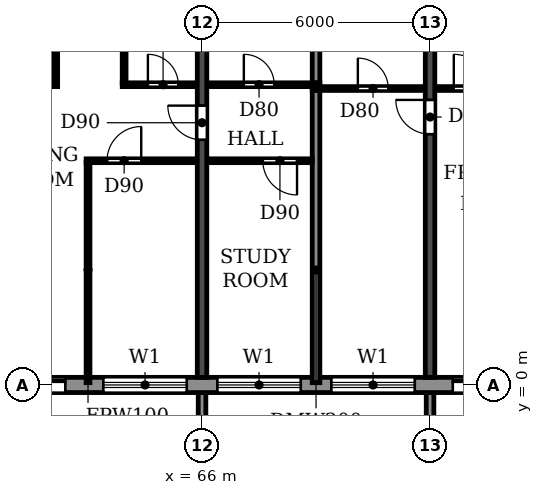
"""IFC4 building model, lengths in metres.
Left out: names, types, materials, properties, quantities, classifications, styles, units other than length and angle.
Written with IfcOpenShell. Run it as: python <this file> out.ifc"""

import sys

from ifc_helpers import new_model, si_unit, direction, frame, frame_2d, origin, place, context, subcontext, project, spatial, polyline, rectangle, outline, extrude, source, transform, mapped, element, fill, save


model = new_model("IFC4")
c1 = context("Model", 3, precision=1e-05, world=origin(), true_north=direction((0.0, 1.0)))
c2 = subcontext(c1, "Body", "Model", "MODEL_VIEW")
j1 = project(units=[si_unit("LENGTHUNIT", "METRE"), si_unit("PLANEANGLEUNIT", "RADIAN")], contexts=[c1])
p1 = place(None, origin())
s1 = spatial("IfcSite", under=j1, at=p1, CompositionType="ELEMENT")
p2 = place(p1, origin())
s2 = spatial("IfcBuilding", under=s1, at=p2, CompositionType="ELEMENT")
p3 = place(p2, frame((0.0, 0.0, 181.8)))
s3 = spatial("IfcBuildingStorey", under=s2, at=p3, CompositionType="ELEMENT", Elevation=181.8)
p4 = place(p3, frame((66.0, 0.2, 0.0), z_axis=(0.0, 0.0, 1.0), x_axis=(0.0, 1.0, 0.0)))
e1 = element("IfcWall", 1, at=p4, inside=s3, PredefinedType="SHEAR", context=c2, shape_type="SweptSolid", body=[
    extrude(rectangle(XDim=11.7, YDim=0.25, at=frame_2d((5.85, 0.0))), origin(), (0.0, 0.0, 1.0), 3.08),
])
p5 = place(p4, frame((6.25, 0.0, 0.0)))
e2 = element("IfcOpeningElement", 2, at=p5, cuts=e1, PredefinedType="OPENING", context=c2, shape_type="SweptSolid", body=[
    extrude(rectangle(XDim=0.9, YDim=2.1, at=frame_2d((0.45, 1.05))), frame((0.0, 0.135, 0.0), z_axis=(0.0, -1.0, 0.0), x_axis=(1.0, 0.0, 0.0)), (0.0, 0.0, 1.0), 0.27),
])
p6 = place(p3, frame((72.0, 0.2, 0.0), z_axis=(0.0, 0.0, 1.0), x_axis=(0.0, 1.0, 0.0)))
e3 = element("IfcWall", 3, at=p6, inside=s3, PredefinedType="SHEAR", context=c2, shape_type="SweptSolid", body=[
    extrude(rectangle(XDim=11.7, YDim=0.25, at=frame_2d((5.85, 0.0))), origin(), (0.0, 0.0, 1.0), 3.08),
])
p7 = place(p6, frame((6.4, 0.0, 0.0)))
e4 = element("IfcOpeningElement", 4, at=p7, cuts=e3, PredefinedType="OPENING", context=c2, shape_type="SweptSolid", body=[
    extrude(rectangle(XDim=0.9, YDim=2.1, at=frame_2d((0.45, 1.05))), frame((0.0, 0.135, 0.0), z_axis=(0.0, -1.0, 0.0), x_axis=(1.0, 0.0, 0.0)), (0.0, 0.0, 1.0), 0.27),
])
p8 = place(p3, frame((22.683, 0.0, 0.0), z_axis=(0.0, 0.0, 1.0), x_axis=(1.0, 0.0, 0.0)))
e5 = element("IfcWall", 5, at=p8, inside=s3, PredefinedType="STANDARD", context=c2, shape_type="SweptSolid", body=[
    extrude(rectangle(XDim=56.634, YDim=0.4, at=frame_2d((28.317, 0.0))), origin(), (0.0, 0.0, 1.0), 3.08),
])
p9 = place(p8, frame((1.717, 0.0, 0.9)))
e6 = element("IfcOpeningElement", 6, at=p9, cuts=e5, PredefinedType="OPENING", context=c2, shape_type="SweptSolid", body=[
    extrude(rectangle(XDim=2.2, YDim=1.5, at=frame_2d((1.1, 0.75))), frame((0.0, 0.21, 0.0), z_axis=(0.0, -1.0, 0.0), x_axis=(1.0, 0.0, 0.0)), (0.0, 0.0, 1.0), 0.42),
])
p10 = place(p8, frame((4.917, 0.0, 0.0)))
e7 = element("IfcOpeningElement", 7, at=p10, cuts=e5, PredefinedType="OPENING", context=c2, shape_type="SweptSolid", body=[
    extrude(rectangle(XDim=1.8, YDim=2.4, at=frame_2d((0.9, 1.2))), frame((0.0, 0.21, 0.0), z_axis=(0.0, -1.0, 0.0), x_axis=(1.0, 0.0, 0.0)), (0.0, 0.0, 1.0), 0.42),
])
p11 = place(p8, frame((7.717, 0.0, 0.9)))
e8 = element("IfcOpeningElement", 8, at=p11, cuts=e5, PredefinedType="OPENING", context=c2, shape_type="SweptSolid", body=[
    extrude(rectangle(XDim=2.2, YDim=1.5, at=frame_2d((1.1, 0.75))), frame((0.0, 0.21, 0.0), z_axis=(0.0, -1.0, 0.0), x_axis=(1.0, 0.0, 0.0)), (0.0, 0.0, 1.0), 0.42),
])
p12 = place(p8, frame((10.717, 0.0, 0.9)))
e9 = element("IfcOpeningElement", 9, at=p12, cuts=e5, PredefinedType="OPENING", context=c2, shape_type="SweptSolid", body=[
    extrude(rectangle(XDim=2.2, YDim=1.5, at=frame_2d((1.1, 0.75))), frame((0.0, 0.21, 0.0), z_axis=(0.0, -1.0, 0.0), x_axis=(1.0, 0.0, 0.0)), (0.0, 0.0, 1.0), 0.42),
])
p13 = place(p8, frame((13.717, 0.0, 0.9)))
e10 = element("IfcOpeningElement", 10, at=p13, cuts=e5, PredefinedType="OPENING", context=c2, shape_type="SweptSolid", body=[
    extrude(rectangle(XDim=2.2, YDim=1.5, at=frame_2d((1.1, 0.75))), frame((0.0, 0.21, 0.0), z_axis=(0.0, -1.0, 0.0), x_axis=(1.0, 0.0, 0.0)), (0.0, 0.0, 1.0), 0.42),
])
p14 = place(p8, frame((16.717, 0.0, 0.9)))
e11 = element("IfcOpeningElement", 11, at=p14, cuts=e5, PredefinedType="OPENING", context=c2, shape_type="SweptSolid", body=[
    extrude(rectangle(XDim=2.2, YDim=1.5, at=frame_2d((1.1, 0.75))), frame((0.0, 0.21, 0.0), z_axis=(0.0, -1.0, 0.0), x_axis=(1.0, 0.0, 0.0)), (0.0, 0.0, 1.0), 0.42),
])
p15 = place(p8, frame((19.717, 0.0, 0.9)))
e12 = element("IfcOpeningElement", 12, at=p15, cuts=e5, PredefinedType="OPENING", context=c2, shape_type="SweptSolid", body=[
    extrude(rectangle(XDim=2.2, YDim=1.5, at=frame_2d((1.1, 0.75))), frame((0.0, 0.21, 0.0), z_axis=(0.0, -1.0, 0.0), x_axis=(1.0, 0.0, 0.0)), (0.0, 0.0, 1.0), 0.42),
])
p16 = place(p8, frame((22.717, 0.0, 0.9)))
e13 = element("IfcOpeningElement", 13, at=p16, cuts=e5, PredefinedType="OPENING", context=c2, shape_type="SweptSolid", body=[
    extrude(rectangle(XDim=2.2, YDim=1.5, at=frame_2d((1.1, 0.75))), frame((0.0, 0.21, 0.0), z_axis=(0.0, -1.0, 0.0), x_axis=(1.0, 0.0, 0.0)), (0.0, 0.0, 1.0), 0.42),
])
p17 = place(p8, frame((25.717, 0.0, 0.9)))
e14 = element("IfcOpeningElement", 14, at=p17, cuts=e5, PredefinedType="OPENING", context=c2, shape_type="SweptSolid", body=[
    extrude(rectangle(XDim=2.2, YDim=1.5, at=frame_2d((1.1, 0.75))), frame((0.0, 0.21, 0.0), z_axis=(0.0, -1.0, 0.0), x_axis=(1.0, 0.0, 0.0)), (0.0, 0.0, 1.0), 0.42),
])
p18 = place(p8, frame((28.717, 0.0, 0.9)))
e15 = element("IfcOpeningElement", 15, at=p18, cuts=e5, PredefinedType="OPENING", context=c2, shape_type="SweptSolid", body=[
    extrude(rectangle(XDim=2.2, YDim=1.5, at=frame_2d((1.1, 0.75))), frame((0.0, 0.21, 0.0), z_axis=(0.0, -1.0, 0.0), x_axis=(1.0, 0.0, 0.0)), (0.0, 0.0, 1.0), 0.42),
])
p19 = place(p8, frame((31.717, 0.0, 0.9)))
e16 = element("IfcOpeningElement", 16, at=p19, cuts=e5, PredefinedType="OPENING", context=c2, shape_type="SweptSolid", body=[
    extrude(rectangle(XDim=2.2, YDim=1.5, at=frame_2d((1.1, 0.75))), frame((0.0, 0.21, 0.0), z_axis=(0.0, -1.0, 0.0), x_axis=(1.0, 0.0, 0.0)), (0.0, 0.0, 1.0), 0.42),
])
p20 = place(p8, frame((34.717, 0.0, 0.9)))
e17 = element("IfcOpeningElement", 17, at=p20, cuts=e5, PredefinedType="OPENING", context=c2, shape_type="SweptSolid", body=[
    extrude(rectangle(XDim=2.2, YDim=1.5, at=frame_2d((1.1, 0.75))), frame((0.0, 0.21, 0.0), z_axis=(0.0, -1.0, 0.0), x_axis=(1.0, 0.0, 0.0)), (0.0, 0.0, 1.0), 0.42),
])
p21 = place(p8, frame((37.917, 0.0, 0.0)))
e18 = element("IfcOpeningElement", 18, at=p21, cuts=e5, PredefinedType="OPENING", context=c2, shape_type="SweptSolid", body=[
    extrude(rectangle(XDim=1.8, YDim=2.4, at=frame_2d((0.9, 1.2))), frame((0.0, 0.21, 0.0), z_axis=(0.0, -1.0, 0.0), x_axis=(1.0, 0.0, 0.0)), (0.0, 0.0, 1.0), 0.42),
])
p22 = place(p8, frame((40.717, 0.0, 0.9)))
e19 = element("IfcOpeningElement", 19, at=p22, cuts=e5, PredefinedType="OPENING", context=c2, shape_type="SweptSolid", body=[
    extrude(rectangle(XDim=2.2, YDim=1.5, at=frame_2d((1.1, 0.75))), frame((0.0, 0.21, 0.0), z_axis=(0.0, -1.0, 0.0), x_axis=(1.0, 0.0, 0.0)), (0.0, 0.0, 1.0), 0.42),
])
p23 = place(p8, frame((43.717, 0.0, 0.9)))
e20 = element("IfcOpeningElement", 20, at=p23, cuts=e5, PredefinedType="OPENING", context=c2, shape_type="SweptSolid", body=[
    extrude(rectangle(XDim=2.2, YDim=1.5, at=frame_2d((1.1, 0.75))), frame((0.0, 0.21, 0.0), z_axis=(0.0, -1.0, 0.0), x_axis=(1.0, 0.0, 0.0)), (0.0, 0.0, 1.0), 0.42),
])
p24 = place(p8, frame((46.717, 0.0, 0.9)))
e21 = element("IfcOpeningElement", 21, at=p24, cuts=e5, PredefinedType="OPENING", context=c2, shape_type="SweptSolid", body=[
    extrude(rectangle(XDim=2.2, YDim=1.5, at=frame_2d((1.1, 0.75))), frame((0.0, 0.21, 0.0), z_axis=(0.0, -1.0, 0.0), x_axis=(1.0, 0.0, 0.0)), (0.0, 0.0, 1.0), 0.42),
])
p25 = place(p8, frame((49.917, 0.0, 0.0)))
e22 = element("IfcOpeningElement", 22, at=p25, cuts=e5, PredefinedType="OPENING", context=c2, shape_type="SweptSolid", body=[
    extrude(rectangle(XDim=1.8, YDim=2.4, at=frame_2d((0.9, 1.2))), frame((0.0, 0.21, 0.0), z_axis=(0.0, -1.0, 0.0), x_axis=(1.0, 0.0, 0.0)), (0.0, 0.0, 1.0), 0.42),
])
p26 = place(p8, frame((52.717, 0.0, 0.9)))
e23 = element("IfcOpeningElement", 23, at=p26, cuts=e5, PredefinedType="OPENING", context=c2, shape_type="SweptSolid", body=[
    extrude(rectangle(XDim=2.2, YDim=1.5, at=frame_2d((1.1, 0.75))), frame((0.0, 0.21, 0.0), z_axis=(0.0, -1.0, 0.0), x_axis=(1.0, 0.0, 0.0)), (0.0, 0.0, 1.0), 0.42),
])
m1 = source(origin(), c2, "Body", "SweptSolid", [
    extrude(outline(polyline([(0.0, 0.0), (0.2, 0.0), (0.2, 1.65), (0.0, 1.65), (0.0, 0.0)])), origin(), (0.0, 0.0, 1.0), 3.1),
])
for number, where in (
    (24, (65.9, -1.85, 0.0)),
    (25, (71.9, -1.85, 0.0)),
):
    element("IfcWall", number, at=place(p3, frame(where)), inside=s3, PredefinedType="STANDARD", context=c2, shape_type="MappedRepresentation", body=[
        mapped(m1, transform((0.0, 0.0, 0.0))),
    ])
p27 = place(p3, frame((69.0, 0.06, 0.0), z_axis=(0.0, 0.0, 1.0), x_axis=(0.0, 1.0, 0.0)))
e26 = element("IfcWall", 26, at=p27, inside=s3, PredefinedType="PARTITIONING", context=c2, shape_type="SweptSolid", body=[
    extrude(rectangle(XDim=7.69, YDim=0.2, at=frame_2d((3.845, 0.0))), origin(), (0.0, 0.0, 1.0), 3.08),
])
p28 = place(p3, frame((69.0, 7.95, 0.0), z_axis=(0.0, 0.0, 1.0), x_axis=(0.0, 1.0, 0.0)))
e27 = element("IfcWall", 27, at=p28, inside=s3, PredefinedType="PARTITIONING", context=c2, shape_type="SweptSolid", body=[
    extrude(rectangle(XDim=3.94, YDim=0.2, at=frame_2d((1.97, 0.0))), origin(), (0.0, 0.0, 1.0), 3.08),
])
p29 = place(p3, frame((62.95, 5.9, 0.0), z_axis=(0.0, 0.0, 1.0), x_axis=(1.0, 0.0, 0.0)))
e28 = element("IfcWall", 28, at=p29, inside=s3, PredefinedType="PARTITIONING", context=c2, shape_type="SweptSolid", body=[
    extrude(rectangle(XDim=2.915, YDim=0.1, at=frame_2d((1.458, 0.0))), origin(), (0.0, 0.0, 1.0), 3.08),
])
p30 = place(p29, frame((0.55, 0.0, 0.0)))
e29 = element("IfcOpeningElement", 29, at=p30, cuts=e28, PredefinedType="OPENING", context=c2, shape_type="SweptSolid", body=[
    extrude(rectangle(XDim=0.9, YDim=2.1, at=frame_2d((0.45, 1.05))), frame((0.0, 0.06, 0.0), z_axis=(0.0, -1.0, 0.0), x_axis=(1.0, 0.0, 0.0)), (0.0, 0.0, 1.0), 0.12),
])
p31 = place(p3, frame((66.135, 5.9, 0.0), z_axis=(0.0, 0.0, 1.0), x_axis=(1.0, 0.0, 0.0)))
e30 = element("IfcWall", 30, at=p31, inside=s3, PredefinedType="PARTITIONING", context=c2, shape_type="SweptSolid", body=[
    extrude(rectangle(XDim=2.765, YDim=0.1, at=frame_2d((1.382, 0.0))), origin(), (0.0, 0.0, 1.0), 3.08),
])
p32 = place(p31, frame((1.465, 0.0, 0.0)))
e31 = element("IfcOpeningElement", 31, at=p32, cuts=e30, PredefinedType="OPENING", context=c2, shape_type="SweptSolid", body=[
    extrude(rectangle(XDim=0.9, YDim=2.1, at=frame_2d((0.45, 1.05))), frame((0.0, 0.06, 0.0), z_axis=(0.0, -1.0, 0.0), x_axis=(1.0, 0.0, 0.0)), (0.0, 0.0, 1.0), 0.12),
])
p33 = place(p3, frame((68.9, 7.8, 0.0), z_axis=(0.0, 0.0, 1.0), x_axis=(1.0, 0.0, 0.0)))
e32 = element("IfcWall", 32, at=p33, inside=s3, PredefinedType="PARTITIONING", context=c2, shape_type="SweptSolid", body=[
    extrude(rectangle(XDim=2.965, YDim=0.1, at=frame_2d((1.482, 0.0))), origin(), (0.0, 0.0, 1.0), 3.08),
])
p34 = place(p33, frame((1.2, 0.0, 0.0)))
e33 = element("IfcOpeningElement", 33, at=p34, cuts=e32, PredefinedType="OPENING", context=c2, shape_type="SweptSolid", body=[
    extrude(rectangle(XDim=0.8, YDim=2.1, at=frame_2d((0.4, 1.05))), frame((0.0, 0.06, 0.0), z_axis=(0.0, -1.0, 0.0), x_axis=(1.0, 0.0, 0.0)), (0.0, 0.0, 1.0), 0.12),
])
p35 = place(p3, frame((72.135, 7.8, 0.0), z_axis=(0.0, 0.0, 1.0), x_axis=(1.0, 0.0, 0.0)))
e34 = element("IfcWall", 34, at=p35, inside=s3, PredefinedType="PARTITIONING", context=c2, shape_type="SweptSolid", body=[
    extrude(rectangle(XDim=2.065, YDim=0.1, at=frame_2d((1.032, 0.0))), origin(), (0.0, 0.0, 1.0), 3.08),
])
p36 = place(p35, frame((0.49, 0.0, 0.0)))
e35 = element("IfcOpeningElement", 35, at=p36, cuts=e34, PredefinedType="OPENING", context=c2, shape_type="SweptSolid", body=[
    extrude(rectangle(XDim=0.9, YDim=2.1, at=frame_2d((0.45, 1.05))), frame((0.0, 0.06, 0.0), z_axis=(0.0, -1.0, 0.0), x_axis=(1.0, 0.0, 0.0)), (0.0, 0.0, 1.0), 0.12),
])
p37 = place(p3, frame((60.135, 7.9, 0.0), z_axis=(0.0, 0.0, 1.0), x_axis=(1.0, 0.0, 0.0)))
e36 = element("IfcWall", 36, at=p37, inside=s3, PredefinedType="PARTITIONING", context=c2, shape_type="SweptSolid", body=[
    extrude(rectangle(XDim=2.065, YDim=0.1, at=frame_2d((1.032, 0.0))), origin(), (0.0, 0.0, 1.0), 3.08),
])
p38 = place(p37, frame((0.49, 0.0, 0.0)))
e37 = element("IfcOpeningElement", 37, at=p38, cuts=e36, PredefinedType="OPENING", context=c2, shape_type="SweptSolid", body=[
    extrude(rectangle(XDim=0.9, YDim=2.1, at=frame_2d((0.45, 1.05))), frame((0.0, 0.06, 0.0), z_axis=(0.0, -1.0, 0.0), x_axis=(1.0, 0.0, 0.0)), (0.0, 0.0, 1.0), 0.12),
])
p39 = place(p3, frame((63.9, 7.9, 0.0), z_axis=(0.0, 0.0, 1.0), x_axis=(1.0, 0.0, 0.0)))
e38 = element("IfcWall", 38, at=p39, inside=s3, PredefinedType="PARTITIONING", context=c2, shape_type="SweptSolid", body=[
    extrude(rectangle(XDim=1.965, YDim=0.1, at=frame_2d((0.982, 0.0))), origin(), (0.0, 0.0, 1.0), 3.08),
])
p40 = place(p39, frame((0.675, 0.0, 0.0)))
e39 = element("IfcOpeningElement", 39, at=p40, cuts=e38, PredefinedType="OPENING", context=c2, shape_type="SweptSolid", body=[
    extrude(rectangle(XDim=0.8, YDim=2.1, at=frame_2d((0.4, 1.05))), frame((0.0, 0.06, 0.0), z_axis=(0.0, -1.0, 0.0), x_axis=(1.0, 0.0, 0.0)), (0.0, 0.0, 1.0), 0.12),
])
p41 = place(p3, frame((66.135, 7.9, 0.0), z_axis=(0.0, 0.0, 1.0), x_axis=(1.0, 0.0, 0.0)))
e40 = element("IfcWall", 40, at=p41, inside=s3, PredefinedType="PARTITIONING", context=c2, shape_type="SweptSolid", body=[
    extrude(rectangle(XDim=2.965, YDim=0.1, at=frame_2d((1.482, 0.0))), origin(), (0.0, 0.0, 1.0), 3.08),
])
p42 = place(p41, frame((0.965, 0.0, 0.0)))
e41 = element("IfcOpeningElement", 41, at=p42, cuts=e40, PredefinedType="OPENING", context=c2, shape_type="SweptSolid", body=[
    extrude(rectangle(XDim=0.8, YDim=2.1, at=frame_2d((0.4, 1.05))), frame((0.0, 0.06, 0.0), z_axis=(0.0, -1.0, 0.0), x_axis=(1.0, 0.0, 0.0)), (0.0, 0.0, 1.0), 0.12),
])
p43 = place(p3, frame((62.15, 7.95, 0.0), z_axis=(0.0, 0.0, 1.0), x_axis=(0.0, 1.0, 0.0)))
e42 = element("IfcWall", 42, at=p43, inside=s3, PredefinedType="PARTITIONING", context=c2, shape_type="SweptSolid", body=[
    extrude(rectangle(XDim=3.94, YDim=0.1, at=frame_2d((1.97, 0.0))), origin(), (0.0, 0.0, 1.0), 3.08),
])
p44 = place(p3, frame((63.0, 0.06, 0.0), z_axis=(0.0, 0.0, 1.0), x_axis=(0.0, 1.0, 0.0)))
e43 = element("IfcWall", 43, at=p44, inside=s3, PredefinedType="PARTITIONING", context=c2, shape_type="SweptSolid", body=[
    extrude(rectangle(XDim=5.79, YDim=0.1, at=frame_2d((2.895, 0.0))), origin(), (0.0, 0.0, 1.0), 3.08),
])
p45 = place(p3, frame((63.95, 7.95, 0.0), z_axis=(0.0, 0.0, 1.0), x_axis=(0.0, 1.0, 0.0)))
e44 = element("IfcWall", 44, at=p45, inside=s3, PredefinedType="PARTITIONING", context=c2, shape_type="SweptSolid", body=[
    extrude(rectangle(XDim=3.94, YDim=0.1, at=frame_2d((1.97, 0.0))), origin(), (0.0, 0.0, 1.0), 3.08),
])
p46 = place(p21, origin())
e45 = element("IfcDoor", 45, at=p46, inside=s3, OperationType="DOUBLE_DOOR_SLIDING", PredefinedType="DOOR", context=c2, shape_type="SweptSolid", body=[
    extrude(rectangle(XDim=1.8, YDim=2.4, at=frame_2d((0.9, 1.2))), frame((0.0, 0.025, 0.0), z_axis=(0.0, -1.0, 0.0), x_axis=(1.0, 0.0, 0.0)), (0.0, 0.0, 1.0), 0.05),
])
fill(e18, e45)
p47 = place(p22, origin())
e46 = element("IfcWindow", 46, at=p47, inside=s3, PartitioningType="DOUBLE_PANEL_HORIZONTAL", PredefinedType="WINDOW", context=c2, shape_type="SweptSolid", body=[
    extrude(rectangle(XDim=2.2, YDim=1.5, at=frame_2d((1.1, 0.75))), frame((0.0, 0.03, 0.0), z_axis=(0.0, -1.0, 0.0), x_axis=(1.0, 0.0, 0.0)), (0.0, 0.0, 1.0), 0.06),
])
fill(e19, e46)
p48 = place(p23, origin())
e47 = element("IfcWindow", 47, at=p48, inside=s3, PartitioningType="DOUBLE_PANEL_HORIZONTAL", PredefinedType="WINDOW", context=c2, shape_type="SweptSolid", body=[
    extrude(rectangle(XDim=2.2, YDim=1.5, at=frame_2d((1.1, 0.75))), frame((0.0, 0.03, 0.0), z_axis=(0.0, -1.0, 0.0), x_axis=(1.0, 0.0, 0.0)), (0.0, 0.0, 1.0), 0.06),
])
fill(e20, e47)
p49 = place(p24, origin())
e48 = element("IfcWindow", 48, at=p49, inside=s3, PartitioningType="DOUBLE_PANEL_HORIZONTAL", PredefinedType="WINDOW", context=c2, shape_type="SweptSolid", body=[
    extrude(rectangle(XDim=2.2, YDim=1.5, at=frame_2d((1.1, 0.75))), frame((0.0, 0.03, 0.0), z_axis=(0.0, -1.0, 0.0), x_axis=(1.0, 0.0, 0.0)), (0.0, 0.0, 1.0), 0.06),
])
fill(e21, e48)
p50 = place(p25, origin())
e49 = element("IfcDoor", 49, at=p50, inside=s3, OperationType="DOUBLE_DOOR_SLIDING", PredefinedType="DOOR", context=c2, shape_type="SweptSolid", body=[
    extrude(rectangle(XDim=1.8, YDim=2.4, at=frame_2d((0.9, 1.2))), frame((0.0, 0.025, 0.0), z_axis=(0.0, -1.0, 0.0), x_axis=(1.0, 0.0, 0.0)), (0.0, 0.0, 1.0), 0.05),
])
fill(e22, e49)
p51 = place(p42, origin())
e50 = element("IfcDoor", 50, at=p51, inside=s3, OperationType="SINGLE_SWING_LEFT", PredefinedType="DOOR", context=c2, shape_type="SweptSolid", body=[
    extrude(rectangle(XDim=0.8, YDim=2.1, at=frame_2d((0.4, 1.05))), frame((0.0, 0.025, 0.0), z_axis=(0.0, -1.0, 0.0), x_axis=(1.0, 0.0, 0.0)), (0.0, 0.0, 1.0), 0.05),
])
fill(e41, e50)
p52 = place(p32, frame((0.9, 0.0, 0.0), z_axis=(0.0, 0.0, 1.0), x_axis=(-1.0, 0.0, 0.0)))
e51 = element("IfcDoor", 51, at=p52, inside=s3, OperationType="SINGLE_SWING_LEFT", PredefinedType="DOOR", context=c2, shape_type="SweptSolid", body=[
    extrude(rectangle(XDim=0.9, YDim=2.1, at=frame_2d((0.45, 1.05))), frame((0.0, 0.025, 0.0), z_axis=(0.0, -1.0, 0.0), x_axis=(1.0, 0.0, 0.0)), (0.0, 0.0, 1.0), 0.05),
])
fill(e31, e51)
p53 = place(p30, origin())
e52 = element("IfcDoor", 52, at=p53, inside=s3, OperationType="SINGLE_SWING_RIGHT", PredefinedType="DOOR", context=c2, shape_type="SweptSolid", body=[
    extrude(rectangle(XDim=0.9, YDim=2.1, at=frame_2d((0.45, 1.05))), frame((0.0, 0.025, 0.0), z_axis=(0.0, -1.0, 0.0), x_axis=(1.0, 0.0, 0.0)), (0.0, 0.0, 1.0), 0.05),
])
fill(e29, e52)
p54 = place(p40, origin())
e53 = element("IfcDoor", 53, at=p54, inside=s3, OperationType="SINGLE_SWING_LEFT", PredefinedType="DOOR", context=c2, shape_type="SweptSolid", body=[
    extrude(rectangle(XDim=0.8, YDim=2.1, at=frame_2d((0.4, 1.05))), frame((0.0, 0.025, 0.0), z_axis=(0.0, -1.0, 0.0), x_axis=(1.0, 0.0, 0.0)), (0.0, 0.0, 1.0), 0.05),
])
fill(e39, e53)
p55 = place(p5, origin())
e54 = element("IfcDoor", 54, at=p55, inside=s3, OperationType="SINGLE_SWING_RIGHT", PredefinedType="DOOR", context=c2, shape_type="SweptSolid", body=[
    extrude(rectangle(XDim=0.9, YDim=2.1, at=frame_2d((0.45, 1.05))), frame((0.0, 0.025, 0.0), z_axis=(0.0, -1.0, 0.0), x_axis=(1.0, 0.0, 0.0)), (0.0, 0.0, 1.0), 0.05),
])
fill(e2, e54)
p56 = place(p34, origin())
e55 = element("IfcDoor", 55, at=p56, inside=s3, OperationType="SINGLE_SWING_LEFT", PredefinedType="DOOR", context=c2, shape_type="SweptSolid", body=[
    extrude(rectangle(XDim=0.8, YDim=2.1, at=frame_2d((0.4, 1.05))), frame((0.0, 0.025, 0.0), z_axis=(0.0, -1.0, 0.0), x_axis=(1.0, 0.0, 0.0)), (0.0, 0.0, 1.0), 0.05),
])
fill(e33, e55)
p57 = place(p7, origin())
e56 = element("IfcDoor", 56, at=p57, inside=s3, OperationType="SINGLE_SWING_RIGHT", PredefinedType="DOOR", context=c2, shape_type="SweptSolid", body=[
    extrude(rectangle(XDim=0.9, YDim=2.1, at=frame_2d((0.45, 1.05))), frame((0.0, 0.025, 0.0), z_axis=(0.0, -1.0, 0.0), x_axis=(1.0, 0.0, 0.0)), (0.0, 0.0, 1.0), 0.05),
])
fill(e4, e56)
p58 = place(p36, origin())
e57 = element("IfcDoor", 57, at=p58, inside=s3, OperationType="SINGLE_SWING_LEFT", PredefinedType="DOOR", context=c2, shape_type="SweptSolid", body=[
    extrude(rectangle(XDim=0.9, YDim=2.1, at=frame_2d((0.45, 1.05))), frame((0.0, 0.025, 0.0), z_axis=(0.0, -1.0, 0.0), x_axis=(1.0, 0.0, 0.0)), (0.0, 0.0, 1.0), 0.05),
])
fill(e35, e57)
save(model, sys.argv[1])
